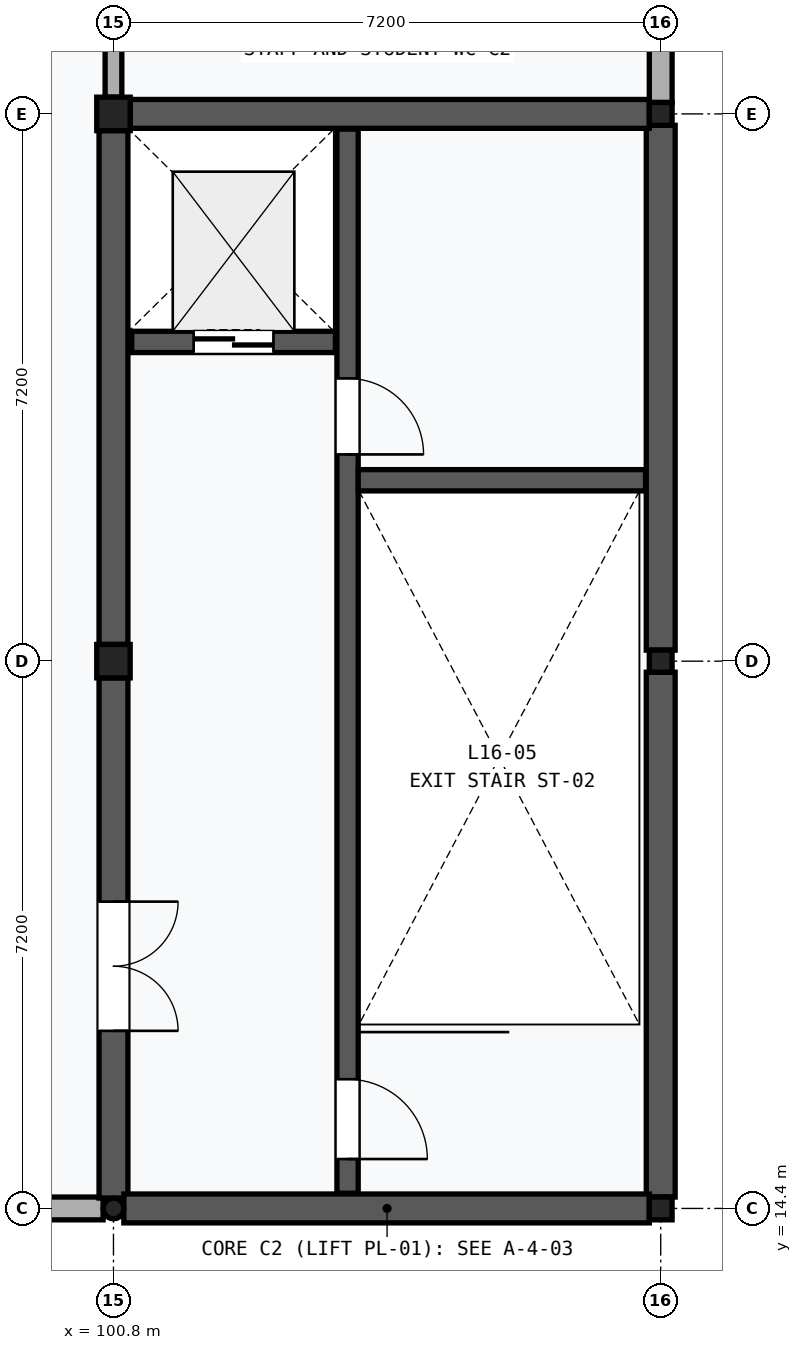
"""IFC4 building model, lengths in metres.
Left out: names, types, materials, properties, quantities, classifications, styles, units other than length and angle.
Written with IfcOpenShell. Run it as: python <this file> out.ifc"""

import sys

from ifc_helpers import new_model, si_unit, direction, frame, frame_2d, origin, origin_2d, place, context, subcontext, project, spatial, rectangle, hollow_circle, i_section, extrude, element, fill, save


model = new_model("IFC4")
c1 = context("Model", 3, precision=1e-05, world=origin(), true_north=direction((0.0, 1.0)))
c2 = subcontext(c1, "Body", "Model", "MODEL_VIEW")
j1 = project(units=[si_unit("LENGTHUNIT", "METRE"), si_unit("PLANEANGLEUNIT", "RADIAN")], contexts=[c1])
p1 = place(None, origin())
s1 = spatial("IfcSite", under=j1, at=p1, CompositionType="ELEMENT")
p2 = place(p1, origin())
s2 = spatial("IfcBuilding", under=s1, at=p2, CompositionType="ELEMENT")
p3 = place(p2, frame((0.0, 0.0, 67.2)))
s3 = spatial("IfcBuildingStorey", under=s2, at=p3, CompositionType="ELEMENT", Elevation=67.2)
p4 = place(p3, frame((100.8, 14.4, 0.0), z_axis=(0.0, 0.0, 1.0), x_axis=(1.0, 0.0, 0.0)))
e1 = element("IfcColumn", 1, at=p4, inside=s3, PredefinedType="COLUMN", context=c2, shape_type="SweptSolid", body=[
    extrude(hollow_circle(Radius=0.136, WallThickness=0.012, at=origin_2d()), origin(), (0.0, 0.0, 1.0), 4.8),
])
for number, where, z_axis, x_axis in (
    (2, (100.8, 21.6, 0.0), (0.0, 0.0, 1.0), (1.0, 0.0, 0.0)),
    (3, (100.8, 28.8, 0.0), (0.0, 0.0, 1.0), (1.0, 0.0, 0.0)),
):
    element("IfcColumn", number, at=place(p3, frame(where, z_axis=z_axis, x_axis=x_axis)), inside=s3, PredefinedType="COLUMN", context=c2, shape_type="SweptSolid", body=[
        extrude(rectangle(XDim=0.44, YDim=0.44, at=origin_2d()), origin(), (0.0, 0.0, 1.0), 4.8),
    ])
p5 = place(p3, frame((108.0, 14.4, 0.0), z_axis=(0.0, 0.0, 1.0), x_axis=(1.0, 0.0, 0.0)))
e4 = element("IfcColumn", 4, at=p5, inside=s3, PredefinedType="COLUMN", context=c2, shape_type="SweptSolid", body=[
    extrude(i_section(OverallWidth=0.3, OverallDepth=0.3, WebThickness=0.011, FlangeThickness=0.019, FilletRadius=0.027, at=origin_2d()), origin(), (0.0, 0.0, 1.0), 4.8),
])
p6 = place(p3, frame((108.0, 21.6, 0.0), z_axis=(0.0, 0.0, 1.0), x_axis=(1.0, 0.0, 0.0)))
e5 = element("IfcColumn", 5, at=p6, inside=s3, PredefinedType="COLUMN", context=c2, shape_type="SweptSolid", body=[
    extrude(i_section(OverallWidth=0.3, OverallDepth=0.29, WebThickness=0.009, FlangeThickness=0.014, FilletRadius=0.027, at=origin_2d()), origin(), (0.0, 0.0, 1.0), 4.8),
])
p7 = place(p3, frame((108.0, 28.8, 0.0), z_axis=(0.0, 0.0, 1.0), x_axis=(1.0, 0.0, 0.0)))
e6 = element("IfcColumn", 6, at=p7, inside=s3, PredefinedType="COLUMN", context=c2, shape_type="SweptSolid", body=[
    extrude(i_section(OverallWidth=0.3, OverallDepth=0.3, WebThickness=0.011, FlangeThickness=0.019, FilletRadius=0.027, at=origin_2d()), origin(), (0.0, 0.0, 1.0), 4.8),
])
p8 = place(p3, frame((93.675, 14.4, 0.0), z_axis=(0.0, 0.0, 1.0), x_axis=(1.0, 0.0, 0.0)))
e7 = element("IfcWall", 7, at=p8, inside=s3, PredefinedType="SOLIDWALL", context=c2, shape_type="SweptSolid", body=[
    extrude(rectangle(XDim=6.989, YDim=0.3, at=frame_2d((3.494, 0.0))), origin(), (0.0, 0.0, 1.0), 4.16),
])
p9 = place(p8, frame((1.844, 0.0, 0.85)))
e8 = element("IfcOpeningElement", 8, at=p9, cuts=e7, PredefinedType="OPENING", context=c2, shape_type="SweptSolid", body=[
    extrude(rectangle(XDim=3.3, YDim=2.0, at=frame_2d((1.65, 1.0))), frame((0.0, 0.162, 0.0), z_axis=(0.0, -1.0, 0.0), x_axis=(1.0, 0.0, 0.0)), (0.0, 0.0, 1.0), 0.324),
])
p10 = place(p3, frame((108.0, 28.95, 0.0), z_axis=(0.0, 0.0, 1.0), x_axis=(0.0, 1.0, 0.0)))
e9 = element("IfcWall", 9, at=p10, inside=s3, PredefinedType="SOLIDWALL", context=c2, shape_type="SweptSolid", body=[
    extrude(rectangle(XDim=6.905, YDim=0.3, at=frame_2d((3.453, 0.0))), origin(), (0.0, 0.0, 1.0), 4.16),
])
p11 = place(p10, frame((2.202, 0.0, 1.1)))
e10 = element("IfcOpeningElement", 10, at=p11, cuts=e9, PredefinedType="OPENING", context=c2, shape_type="SweptSolid", body=[
    extrude(rectangle(XDim=2.5, YDim=1.5, at=frame_2d((1.25, 0.75))), frame((0.0, 0.162, 0.0), z_axis=(0.0, -1.0, 0.0), x_axis=(1.0, 0.0, 0.0)), (0.0, 0.0, 1.0), 0.324),
])
p12 = place(p3, frame((100.8, 14.537, 0.0), z_axis=(0.0, 0.0, 1.0), x_axis=(0.0, 1.0, 0.0)))
e11 = element("IfcWall", 11, at=p12, inside=s3, PredefinedType="SHEAR", context=c2, shape_type="SweptSolid", body=[
    extrude(rectangle(XDim=6.843, YDim=0.38, at=frame_2d((3.422, 0.0))), origin(), (0.0, 0.0, 1.0), 4.26),
])
p13 = place(p12, frame((2.2, 0.0, 0.0)))
e12 = element("IfcOpeningElement", 12, at=p13, cuts=e11, PredefinedType="OPENING", context=c2, shape_type="SweptSolid", body=[
    extrude(rectangle(XDim=1.7, YDim=2.25, at=frame_2d((0.85, 1.125))), frame((0.0, 0.202, 0.0), z_axis=(0.0, -1.0, 0.0), x_axis=(1.0, 0.0, 0.0)), (0.0, 0.0, 1.0), 0.404),
])
p14 = place(p3, frame((100.8, 21.82, 0.0), z_axis=(0.0, 0.0, 1.0), x_axis=(0.0, 1.0, 0.0)))
e13 = element("IfcWall", 13, at=p14, inside=s3, PredefinedType="SHEAR", context=c2, shape_type="SweptSolid", body=[
    extrude(rectangle(XDim=6.76, YDim=0.38, at=frame_2d((3.38, 0.0))), origin(), (0.0, 0.0, 1.0), 4.26),
])
p15 = place(p3, frame((108.0, 14.55, 0.0), z_axis=(0.0, 0.0, 1.0), x_axis=(0.0, 1.0, 0.0)))
e14 = element("IfcWall", 14, at=p15, inside=s3, PredefinedType="SHEAR", context=c2, shape_type="SweptSolid", body=[
    extrude(rectangle(XDim=6.905, YDim=0.38, at=frame_2d((3.453, 0.0))), origin(), (0.0, 0.0, 1.0), 4.16),
])
p16 = place(p3, frame((108.0, 21.745, 0.0), z_axis=(0.0, 0.0, 1.0), x_axis=(0.0, 1.0, 0.0)))
e15 = element("IfcWall", 15, at=p16, inside=s3, PredefinedType="SHEAR", context=c2, shape_type="SweptSolid", body=[
    extrude(rectangle(XDim=6.905, YDim=0.38, at=frame_2d((3.452, 0.0))), origin(), (0.0, 0.0, 1.0), 4.16),
])
p17 = place(p3, frame((100.937, 14.4, 0.0), z_axis=(0.0, 0.0, 1.0), x_axis=(1.0, 0.0, 0.0)))
e16 = element("IfcWall", 16, at=p17, inside=s3, PredefinedType="SHEAR", context=c2, shape_type="SweptSolid", body=[
    extrude(rectangle(XDim=6.914, YDim=0.38, at=frame_2d((3.457, 0.0))), origin(), (0.0, 0.0, 1.0), 4.16),
])
p18 = place(p3, frame((101.02, 28.8, 0.0), z_axis=(0.0, 0.0, 1.0), x_axis=(1.0, 0.0, 0.0)))
e17 = element("IfcWall", 17, at=p18, inside=s3, PredefinedType="SHEAR", context=c2, shape_type="SweptSolid", body=[
    extrude(rectangle(XDim=6.83, YDim=0.38, at=frame_2d((3.415, 0.0))), origin(), (0.0, 0.0, 1.0), 4.2),
])
p19 = place(p3, frame((103.88, 14.6, 0.0), z_axis=(0.0, 0.0, 1.0), x_axis=(0.0, 1.0, 0.0)))
e18 = element("IfcWall", 18, at=p19, inside=s3, PredefinedType="SHEAR", context=c2, shape_type="SweptSolid", body=[
    extrude(rectangle(XDim=14.0, YDim=0.28, at=frame_2d((7.0, 0.0))), origin(), (0.0, 0.0, 1.0), 4.54),
])
p20 = place(p19, frame((0.45, 0.0, 0.0)))
e19 = element("IfcOpeningElement", 19, at=p20, cuts=e18, PredefinedType="OPENING", context=c2, shape_type="SweptSolid", body=[
    extrude(rectangle(XDim=1.05, YDim=2.15, at=frame_2d((0.525, 1.075))), frame((0.0, 0.152, 0.0), z_axis=(0.0, -1.0, 0.0), x_axis=(1.0, 0.0, 0.0)), (0.0, 0.0, 1.0), 0.304),
])
p21 = place(p19, frame((9.72, 0.0, 0.0)))
e20 = element("IfcOpeningElement", 20, at=p21, cuts=e18, PredefinedType="OPENING", context=c2, shape_type="SweptSolid", body=[
    extrude(rectangle(XDim=1.0, YDim=2.15, at=frame_2d((0.5, 1.075))), frame((0.0, 0.152, 0.0), z_axis=(0.0, -1.0, 0.0), x_axis=(1.0, 0.0, 0.0)), (0.0, 0.0, 1.0), 0.304),
])
p22 = place(p3, frame((104.02, 23.98, 0.0), z_axis=(0.0, 0.0, 1.0), x_axis=(1.0, 0.0, 0.0)))
e21 = element("IfcWall", 21, at=p22, inside=s3, PredefinedType="SHEAR", context=c2, shape_type="SweptSolid", body=[
    extrude(rectangle(XDim=3.78, YDim=0.28, at=frame_2d((1.89, 0.0))), origin(), (0.0, 0.0, 1.0), 4.54),
])
p23 = place(p3, frame((101.04, 25.8, 0.0), z_axis=(0.0, 0.0, 1.0), x_axis=(1.0, 0.0, 0.0)))
e22 = element("IfcWall", 22, at=p23, inside=s3, PredefinedType="SHEAR", context=c2, shape_type="SweptSolid", body=[
    extrude(rectangle(XDim=2.68, YDim=0.28, at=frame_2d((1.34, 0.0))), origin(), (0.0, 0.0, 1.0), 4.54),
])
p24 = place(p23, frame((0.815, 0.0, 0.0)))
e23 = element("IfcOpeningElement", 23, at=p24, cuts=e22, PredefinedType="OPENING", context=c2, shape_type="SweptSolid", body=[
    extrude(rectangle(XDim=1.05, YDim=2.2, at=frame_2d((0.525, 1.1))), frame((0.0, 0.152, 0.0), z_axis=(0.0, -1.0, 0.0), x_axis=(1.0, 0.0, 0.0)), (0.0, 0.0, 1.0), 0.304),
])
p25 = place(p3, frame((100.8, 29.02, 0.0), z_axis=(0.0, 0.0, 1.0), x_axis=(0.0, 1.0, 0.0)))
e24 = element("IfcWall", 24, at=p25, inside=s3, PredefinedType="PARTITIONING", context=c2, shape_type="SweptSolid", body=[
    extrude(rectangle(XDim=6.76, YDim=0.22, at=frame_2d((3.38, 0.0))), origin(), (0.0, 0.0, 1.0), 4.26),
])
p26 = place(p25, frame((2.84, 0.0, 0.0)))
e25 = element("IfcOpeningElement", 25, at=p26, cuts=e24, PredefinedType="OPENING", context=c2, shape_type="SweptSolid", body=[
    extrude(rectangle(XDim=1.08, YDim=2.18, at=frame_2d((0.54, 1.09))), frame((0.0, 0.122, 0.0), z_axis=(0.0, -1.0, 0.0), x_axis=(1.0, 0.0, 0.0)), (0.0, 0.0, 1.0), 0.244),
])
p27 = place(p13, frame((1.7, 0.0, 0.0), z_axis=(0.0, 0.0, 1.0), x_axis=(-1.0, 0.0, 0.0)))
e26 = element("IfcDoor", 26, at=p27, inside=s3, OperationType="DOUBLE_DOOR_SINGLE_SWING", PredefinedType="DOOR", context=c2, shape_type="SweptSolid", body=[
    extrude(rectangle(XDim=1.7, YDim=2.25, at=frame_2d((0.85, 1.125))), frame((0.0, 0.025, 0.0), z_axis=(0.0, -1.0, 0.0), x_axis=(1.0, 0.0, 0.0)), (0.0, 0.0, 1.0), 0.05),
])
fill(e12, e26)
p28 = place(p20, frame((1.05, 0.0, 0.0), z_axis=(0.0, 0.0, 1.0), x_axis=(-1.0, 0.0, 0.0)))
e27 = element("IfcDoor", 27, at=p28, inside=s3, OperationType="SINGLE_SWING_RIGHT", PredefinedType="DOOR", context=c2, shape_type="SweptSolid", body=[
    extrude(rectangle(XDim=1.05, YDim=2.15, at=frame_2d((0.525, 1.075))), frame((0.0, 0.025, 0.0), z_axis=(0.0, -1.0, 0.0), x_axis=(1.0, 0.0, 0.0)), (0.0, 0.0, 1.0), 0.05),
])
fill(e19, e27)
p29 = place(p21, frame((1.0, 0.0, 0.0), z_axis=(0.0, 0.0, 1.0), x_axis=(-1.0, 0.0, 0.0)))
e28 = element("IfcDoor", 28, at=p29, inside=s3, OperationType="SINGLE_SWING_RIGHT", PredefinedType="DOOR", context=c2, shape_type="SweptSolid", body=[
    extrude(rectangle(XDim=1.0, YDim=2.15, at=frame_2d((0.5, 1.075))), frame((0.0, 0.025, 0.0), z_axis=(0.0, -1.0, 0.0), x_axis=(1.0, 0.0, 0.0)), (0.0, 0.0, 1.0), 0.05),
])
fill(e20, e28)
p30 = place(p24, frame((1.05, 0.0, 0.0), z_axis=(0.0, 0.0, 1.0), x_axis=(-1.0, 0.0, 0.0)))
e29 = element("IfcDoor", 29, at=p30, inside=s3, OperationType="DOUBLE_DOOR_SLIDING", PredefinedType="DOOR", context=c2, shape_type="SweptSolid", body=[
    extrude(rectangle(XDim=1.05, YDim=2.2, at=frame_2d((0.525, 1.1))), frame((0.0, 0.025, 0.0), z_axis=(0.0, -1.0, 0.0), x_axis=(1.0, 0.0, 0.0)), (0.0, 0.0, 1.0), 0.05),
])
fill(e23, e29)
save(model, sys.argv[1])
